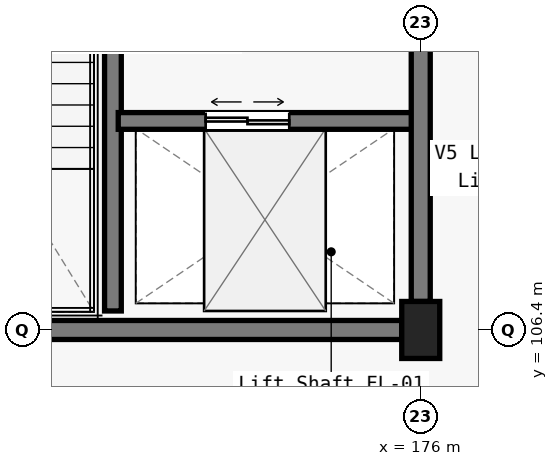
"""IFC4 building model, lengths in metres.
Left out: names, types, materials, properties, quantities, classifications, styles, units other than length and angle.
Written with IfcOpenShell. Run it as: python <this file> out.ifc"""

import sys

from ifc_helpers import new_model, si_unit, direction, frame, frame_2d, origin, origin_2d, place, context, subcontext, project, spatial, rectangle, extrude, element, fill, save


model = new_model("IFC4")
c1 = context("Model", 3, precision=1e-05, world=origin(), true_north=direction((0.0, 1.0)))
c2 = subcontext(c1, "Body", "Model", "MODEL_VIEW")
j1 = project(units=[si_unit("LENGTHUNIT", "METRE"), si_unit("PLANEANGLEUNIT", "RADIAN")], contexts=[c1])
p1 = place(None, origin())
s1 = spatial("IfcSite", under=j1, at=p1, CompositionType="ELEMENT")
p2 = place(p1, origin())
s2 = spatial("IfcBuilding", under=s1, at=p2, CompositionType="ELEMENT")
p3 = place(p2, frame((0.0, 0.0, 5.4)))
s3 = spatial("IfcBuildingStorey", under=s2, at=p3, CompositionType="ELEMENT", Elevation=5.4)
p4 = place(p3, frame((176.0, 106.4, 0.0), z_axis=(0.0, 0.0, 1.0), x_axis=(1.0, 0.0, 0.0)))
e1 = element("IfcColumn", 1, at=p4, inside=s3, PredefinedType="COLUMN", context=c2, shape_type="SweptSolid", body=[
    extrude(rectangle(XDim=0.5, YDim=0.75, at=origin_2d()), origin(), (0.0, 0.0, 1.0), 4.8),
])
p5 = place(p3, frame((168.3, 106.4, 0.0), z_axis=(0.0, 0.0, 1.0), x_axis=(1.0, 0.0, 0.0)))
e2 = element("IfcWall", 2, at=p5, inside=s3, PredefinedType="SOLIDWALL", context=c2, shape_type="SweptSolid", body=[
    extrude(rectangle(XDim=7.45, YDim=0.25, at=frame_2d((3.725, 0.0))), origin(), (0.0, 0.0, 1.0), 3.635),
])
p6 = place(p3, frame((171.95, 106.65, 0.0), z_axis=(0.0, 0.0, 1.0), x_axis=(0.0, 1.0, 0.0)))
e3 = element("IfcWall", 3, at=p6, inside=s3, PredefinedType="SOLIDWALL", context=c2, shape_type="SweptSolid", body=[
    extrude(rectangle(XDim=7.1, YDim=0.22, at=frame_2d((3.55, 0.0))), origin(), (0.0, 0.0, 1.0), 4.51),
])
p7 = place(p6, frame((5.55, 0.0, 0.0)))
e4 = element("IfcOpeningElement", 4, at=p7, cuts=e3, PredefinedType="OPENING", context=c2, shape_type="SweptSolid", body=[
    extrude(rectangle(XDim=1.2, YDim=2.15, at=frame_2d((0.6, 1.075))), frame((0.0, 0.12, 0.0), z_axis=(0.0, -1.0, 0.0), x_axis=(1.0, 0.0, 0.0)), (0.0, 0.0, 1.0), 0.24),
])
p8 = place(p3, frame((172.02, 109.15, 0.0), z_axis=(0.0, 0.0, 1.0), x_axis=(1.0, 0.0, 0.0)))
e5 = element("IfcWall", 5, at=p8, inside=s3, PredefinedType="SOLIDWALL", context=c2, shape_type="SweptSolid", body=[
    extrude(rectangle(XDim=3.93, YDim=0.22, at=frame_2d((1.965, 0.0))), origin(), (0.0, 0.0, 1.0), 3.885),
])
p9 = place(p8, frame((1.15, 0.0, 0.0)))
e6 = element("IfcOpeningElement", 6, at=p9, cuts=e5, PredefinedType="OPENING", context=c2, shape_type="SweptSolid", body=[
    extrude(rectangle(XDim=1.1, YDim=2.2, at=frame_2d((0.55, 1.1))), frame((0.0, 0.12, 0.0), z_axis=(0.0, -1.0, 0.0), x_axis=(1.0, 0.0, 0.0)), (0.0, 0.0, 1.0), 0.24),
])
p10 = place(p3, frame((176.0, 106.775, 0.0), z_axis=(0.0, 0.0, 1.0), x_axis=(0.0, 1.0, 0.0)))
e7 = element("IfcWall", 7, at=p10, inside=s3, PredefinedType="SOLIDWALL", context=c2, shape_type="SweptSolid", body=[
    extrude(rectangle(XDim=6.925, YDim=0.25, at=frame_2d((3.462, 0.0))), origin(), (0.0, 0.0, 1.0), 3.635),
])
p11 = place(p10, frame((3.475, 0.0, 0.0)))
e8 = element("IfcOpeningElement", 8, at=p11, cuts=e7, PredefinedType="OPENING", context=c2, shape_type="SweptSolid", body=[
    extrude(rectangle(XDim=1.35, YDim=2.2, at=frame_2d((0.675, 1.1))), frame((0.0, 0.135, 0.0), z_axis=(0.0, -1.0, 0.0), x_axis=(1.0, 0.0, 0.0)), (0.0, 0.0, 1.0), 0.27),
])
p12 = place(p9, origin())
e9 = element("IfcDoor", 9, at=p12, inside=s3, OperationType="DOUBLE_DOOR_SLIDING", PredefinedType="DOOR", context=c2, shape_type="SweptSolid", body=[
    extrude(rectangle(XDim=1.1, YDim=2.2, at=frame_2d((0.55, 1.1))), frame((0.0, 0.025, 0.0), z_axis=(0.0, -1.0, 0.0), x_axis=(1.0, 0.0, 0.0)), (0.0, 0.0, 1.0), 0.05),
])
fill(e6, e9)
save(model, sys.argv[1])
